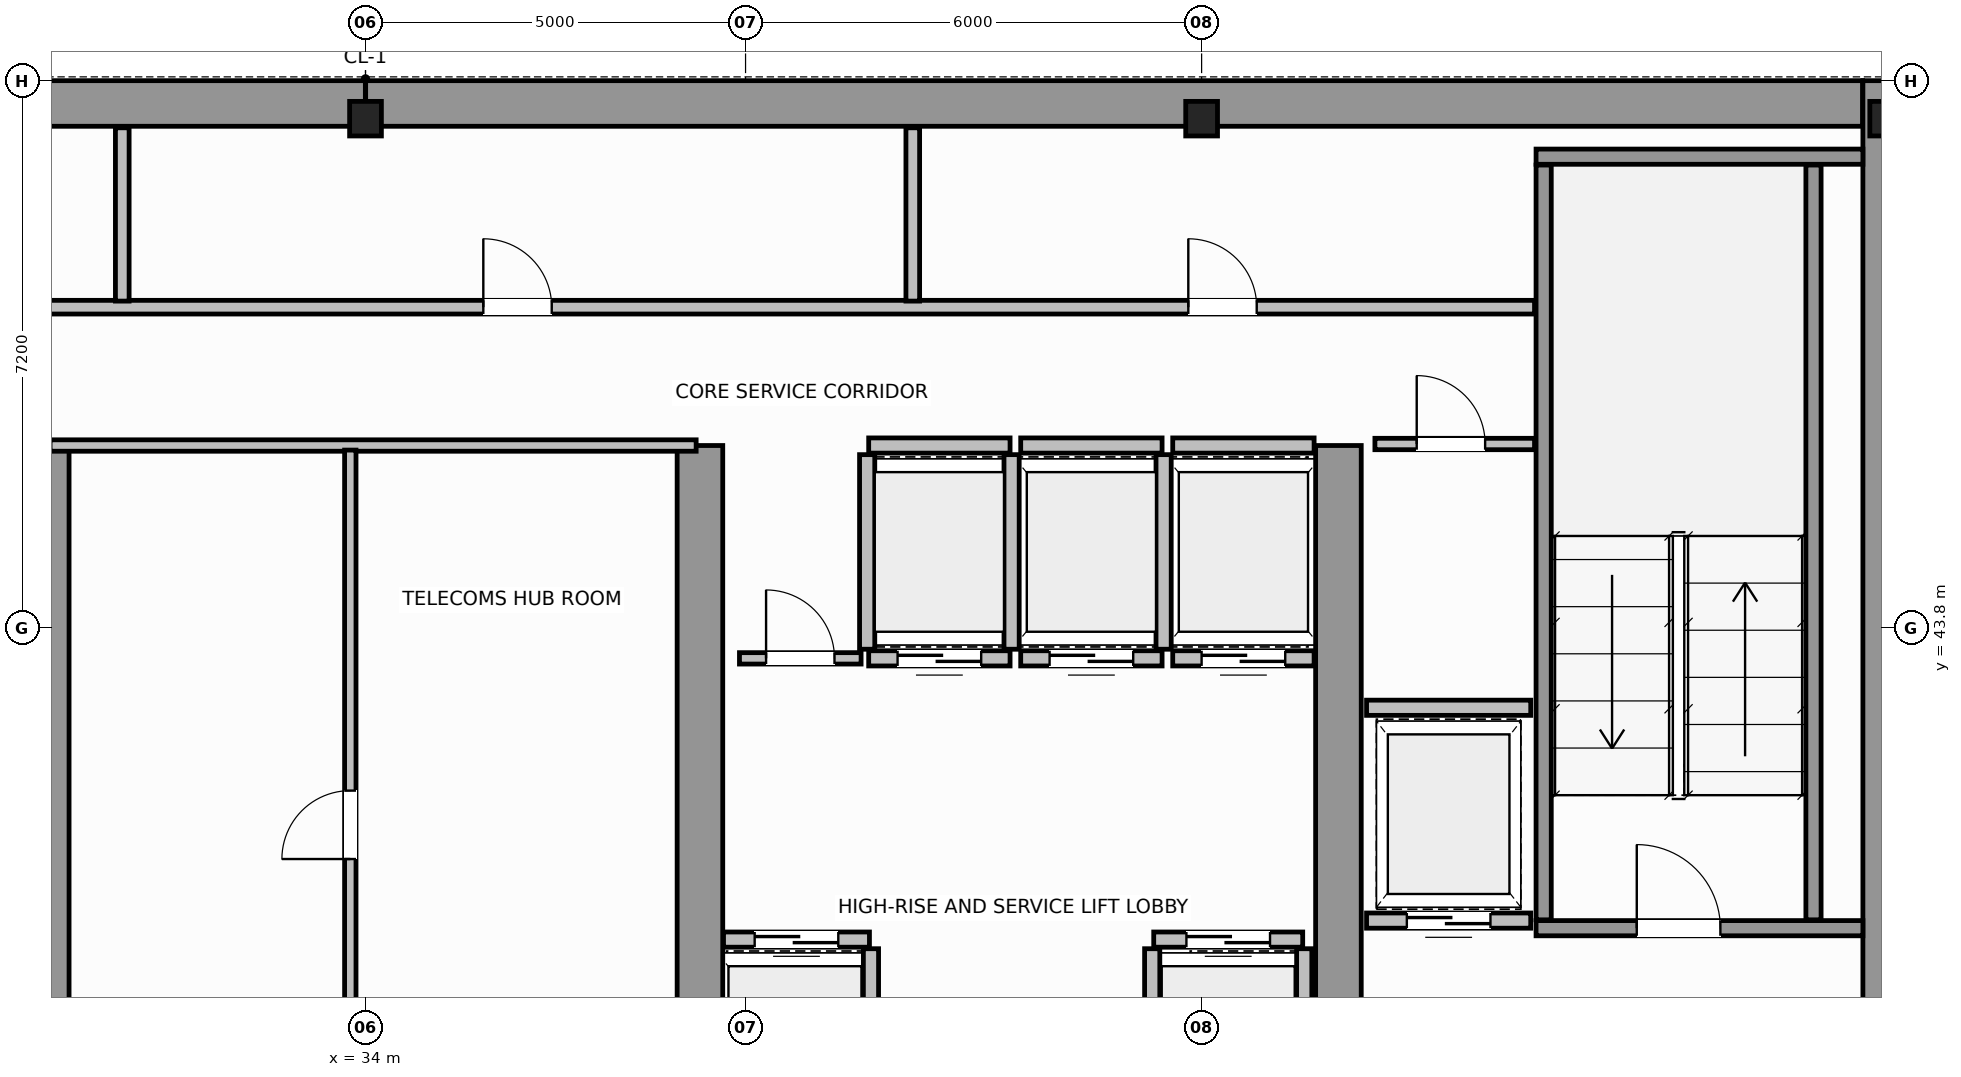
"""IFC4 building model, lengths in metres.
Left out: names, types, materials, properties, quantities, classifications, styles, units other than length and angle.
Written with IfcOpenShell. Run it as: python <this file> out.ifc"""

import sys

from ifc_helpers import new_model, si_unit, direction, frame, frame_2d, origin, origin_2d, place, context, subcontext, project, spatial, rectangle, i_section, extrude, source, transform, mapped, element, fill, save


model = new_model("IFC4")
c1 = context("Model", 3, precision=1e-05, world=origin(), true_north=direction((0.0, 1.0)))
c2 = subcontext(c1, "Body", "Model", "MODEL_VIEW")
j1 = project(units=[si_unit("LENGTHUNIT", "METRE"), si_unit("PLANEANGLEUNIT", "RADIAN")], contexts=[c1])
p1 = place(None, origin())
s1 = spatial("IfcSite", under=j1, at=p1, CompositionType="ELEMENT")
p2 = place(p1, origin())
s2 = spatial("IfcBuilding", under=s1, at=p2, CompositionType="ELEMENT")
p3 = place(p2, frame((0.0, 0.0, 238.4)))
s3 = spatial("IfcBuildingStorey", under=s2, at=p3, CompositionType="ELEMENT", Elevation=238.4)
m1 = source(origin(), c2, "Body", "SweptSolid", [
    extrude(i_section(OverallWidth=0.418, OverallDepth=0.455, WebThickness=0.042, FlangeThickness=0.058, FilletRadius=0.015, at=origin_2d()), origin(), (0.0, 0.0, 1.0), 3.8),
])
for number, where, z_axis, x_axis in (
    (1, (34.0, 50.5, 0.0), (0.0, 0.0, 1.0), (1.0, 0.0, 0.0)),
    (2, (45.0, 50.5, 0.0), (0.0, 0.0, 1.0), (1.0, 0.0, 0.0)),
    (3, (54.0, 50.5, 0.0), (0.0, 0.0, 1.0), (1.0, 0.0, 0.0)),
):
    element("IfcColumn", number, at=place(p3, frame(where, z_axis=z_axis, x_axis=x_axis)), inside=s3, PredefinedType="COLUMN", context=c2, shape_type="MappedRepresentation", body=[
        mapped(m1, transform((0.0, 0.0, 0.0), scale=1.0)),
    ])
for number, where, z_axis, x_axis in (
    (4, (14.304, 50.7, 0.0), (0.0, 0.0, 1.0), (1.0, 0.0, 0.0)),
    (5, (34.002, 50.7, 0.0), (0.0, 0.0, 1.0), (1.0, 0.0, 0.0)),
):
    element("IfcWall", number, at=place(p3, frame(where, z_axis=z_axis, x_axis=x_axis)), inside=s3, PredefinedType="SHEAR", context=c2, shape_type="SweptSolid", body=[
        extrude(rectangle(XDim=19.694, YDim=0.6, at=frame_2d((9.847, 0.0))), origin(), (0.0, 0.0, 1.0), 3.8),
    ])
p4 = place(p3, frame((54.0, 36.5, 0.0), z_axis=(0.0, 0.0, 1.0), x_axis=(0.0, 1.0, 0.0)))
e6 = element("IfcWall", 6, at=p4, inside=s3, PredefinedType="SHEAR", context=c2, shape_type="SweptSolid", body=[
    extrude(rectangle(XDim=14.5, YDim=0.6, at=frame_2d((7.25, 0.0))), origin(), (0.0, 0.0, 1.0), 3.8),
])
for number, where, z_axis, x_axis in (
    (7, (29.8, 36.82, 0.0), (0.0, 0.0, 1.0), (0.0, 1.0, 0.0)),
    (8, (38.4, 36.82, 0.0), (0.0, 0.0, 1.0), (0.0, 1.0, 0.0)),
    (9, (46.8, 36.82, 0.0), (0.0, 0.0, 1.0), (0.0, 1.0, 0.0)),
):
    element("IfcWall", number, at=place(p3, frame(where, z_axis=z_axis, x_axis=x_axis)), inside=s3, PredefinedType="SHEAR", context=c2, shape_type="SweptSolid", body=[
        extrude(rectangle(XDim=9.38, YDim=0.6, at=frame_2d((4.69, 0.0))), origin(), (0.0, 0.0, 1.0), 3.8),
    ])
p5 = place(p3, frame((49.4, 39.85, 0.0), z_axis=(0.0, 0.0, 1.0), x_axis=(1.0, 0.0, 0.0)))
e10 = element("IfcWall", 10, at=p5, inside=s3, PredefinedType="SOLIDWALL", context=c2, shape_type="SweptSolid", body=[
    extrude(rectangle(XDim=4.3, YDim=0.2, at=frame_2d((2.15, 0.0))), origin(), (0.0, 0.0, 1.0), 3.8),
])
p6 = place(p5, frame((1.325, 0.0, 0.0)))
e11 = element("IfcOpeningElement", 11, at=p6, cuts=e10, PredefinedType="OPENING", context=c2, shape_type="SweptSolid", body=[
    extrude(rectangle(XDim=1.1, YDim=2.15, at=frame_2d((0.55, 1.075))), frame((0.0, 0.11, 0.0), z_axis=(0.0, -1.0, 0.0), x_axis=(1.0, 0.0, 0.0)), (0.0, 0.0, 1.0), 0.22),
])
p7 = place(p3, frame((49.4, 50.0, 0.0), z_axis=(0.0, 0.0, 1.0), x_axis=(1.0, 0.0, 0.0)))
e12 = element("IfcWall", 12, at=p7, inside=s3, PredefinedType="SOLIDWALL", context=c2, shape_type="SweptSolid", body=[
    extrude(rectangle(XDim=4.3, YDim=0.2, at=frame_2d((2.15, 0.0))), origin(), (0.0, 0.0, 1.0), 3.8),
])
for number, where, z_axis, x_axis in (
    (13, (49.5, 39.96, 0.0), (0.0, 0.0, 1.0), (0.0, 1.0, 0.0)),
    (14, (53.05, 39.96, 0.0), (0.0, 0.0, 1.0), (0.0, 1.0, 0.0)),
):
    element("IfcWall", number, at=place(p3, frame(where, z_axis=z_axis, x_axis=x_axis)), inside=s3, PredefinedType="SOLIDWALL", context=c2, shape_type="SweptSolid", body=[
        extrude(rectangle(XDim=9.93, YDim=0.2, at=frame_2d((4.965, 0.0))), origin(), (0.0, 0.0, 1.0), 3.8),
    ])
p8 = place(p3, frame((38.71, 39.7, 0.0), z_axis=(0.0, 0.0, 1.0), x_axis=(1.0, 0.0, 0.0)))
e15 = element("IfcWall", 15, at=p8, inside=s3, PredefinedType="SOLIDWALL", context=c2, shape_type="SweptSolid", body=[
    extrude(rectangle(XDim=1.92, YDim=0.2, at=frame_2d((0.96, 0.0))), origin(), (0.0, 0.0, 1.0), 3.58),
])
p9 = place(p8, frame((0.41, 0.0, 0.0)))
e16 = element("IfcOpeningElement", 16, at=p9, cuts=e15, PredefinedType="OPENING", context=c2, shape_type="SweptSolid", body=[
    extrude(rectangle(XDim=1.1, YDim=2.15, at=frame_2d((0.55, 1.075))), frame((0.0, 0.11, 0.0), z_axis=(0.0, -1.0, 0.0), x_axis=(1.0, 0.0, 0.0)), (0.0, 0.0, 1.0), 0.22),
])
p10 = place(p3, frame((40.65, 37.02, 0.0), z_axis=(0.0, 0.0, 1.0), x_axis=(0.0, 1.0, 0.0)))
e17 = element("IfcWall", 17, at=p10, inside=s3, PredefinedType="SOLIDWALL", context=c2, shape_type="SweptSolid", body=[
    extrude(rectangle(XDim=2.56, YDim=0.2, at=frame_2d((1.28, 0.0))), origin(), (0.0, 0.0, 1.0), 3.58),
])
p11 = place(p3, frame((44.37, 39.7, 0.0), z_axis=(0.0, 0.0, 1.0), x_axis=(1.0, 0.0, 0.0)))
e18 = element("IfcWall", 18, at=p11, inside=s3, PredefinedType="SOLIDWALL", context=c2, shape_type="SweptSolid", body=[
    extrude(rectangle(XDim=1.96, YDim=0.2, at=frame_2d((0.98, 0.0))), origin(), (0.0, 0.0, 1.0), 3.58),
])
p12 = place(p11, frame((0.43, 0.0, 0.0)))
e19 = element("IfcOpeningElement", 19, at=p12, cuts=e18, PredefinedType="OPENING", context=c2, shape_type="SweptSolid", body=[
    extrude(rectangle(XDim=1.1, YDim=2.15, at=frame_2d((0.55, 1.075))), frame((0.0, 0.11, 0.0), z_axis=(0.0, -1.0, 0.0), x_axis=(1.0, 0.0, 0.0)), (0.0, 0.0, 1.0), 0.22),
])
for number, where, z_axis, x_axis in (
    (20, (44.35, 37.02, 0.0), (0.0, 0.0, 1.0), (0.0, 1.0, 0.0)),
    (21, (46.35, 37.02, 0.0), (0.0, 0.0, 1.0), (0.0, 1.0, 0.0)),
):
    element("IfcWall", number, at=place(p3, frame(where, z_axis=z_axis, x_axis=x_axis)), inside=s3, PredefinedType="SOLIDWALL", context=c2, shape_type="SweptSolid", body=[
        extrude(rectangle(XDim=2.56, YDim=0.2, at=frame_2d((1.28, 0.0))), origin(), (0.0, 0.0, 1.0), 3.58),
    ])
p13 = place(p3, frame((40.62, 43.4, 0.0), z_axis=(0.0, 0.0, 1.0), x_axis=(1.0, 0.0, 0.0)))
e22 = element("IfcWall", 22, at=p13, inside=s3, PredefinedType="SOLIDWALL", context=c2, shape_type="SweptSolid", body=[
    extrude(rectangle(XDim=1.86, YDim=0.2, at=frame_2d((0.93, 0.0))), origin(), (0.0, 0.0, 1.0), 3.58),
])
p14 = place(p13, frame((0.38, 0.0, 0.0)))
e23 = element("IfcOpeningElement", 23, at=p14, cuts=e22, PredefinedType="OPENING", context=c2, shape_type="SweptSolid", body=[
    extrude(rectangle(XDim=1.1, YDim=2.15, at=frame_2d((0.55, 1.075))), frame((0.0, 0.11, 0.0), z_axis=(0.0, -1.0, 0.0), x_axis=(1.0, 0.0, 0.0)), (0.0, 0.0, 1.0), 0.22),
])
p15 = place(p3, frame((40.62, 46.2, 0.0), z_axis=(0.0, 0.0, 1.0), x_axis=(1.0, 0.0, 0.0)))
e24 = element("IfcWall", 24, at=p15, inside=s3, PredefinedType="SOLIDWALL", context=c2, shape_type="SweptSolid", body=[
    extrude(rectangle(XDim=1.86, YDim=0.2, at=frame_2d((0.93, 0.0))), origin(), (0.0, 0.0, 1.0), 3.58),
])
for number, where, z_axis, x_axis in (
    (25, (40.6, 43.52, 0.0), (0.0, 0.0, 1.0), (0.0, 1.0, 0.0)),
    (26, (42.5, 43.52, 0.0), (0.0, 0.0, 1.0), (0.0, 1.0, 0.0)),
):
    element("IfcWall", number, at=place(p3, frame(where, z_axis=z_axis, x_axis=x_axis)), inside=s3, PredefinedType="SOLIDWALL", context=c2, shape_type="SweptSolid", body=[
        extrude(rectangle(XDim=2.56, YDim=0.2, at=frame_2d((1.28, 0.0))), origin(), (0.0, 0.0, 1.0), 3.58),
    ])
p16 = place(p3, frame((42.62, 43.4, 0.0), z_axis=(0.0, 0.0, 1.0), x_axis=(1.0, 0.0, 0.0)))
e27 = element("IfcWall", 27, at=p16, inside=s3, PredefinedType="SOLIDWALL", context=c2, shape_type="SweptSolid", body=[
    extrude(rectangle(XDim=1.86, YDim=0.2, at=frame_2d((0.93, 0.0))), origin(), (0.0, 0.0, 1.0), 3.58),
])
p17 = place(p16, frame((0.38, 0.0, 0.0)))
e28 = element("IfcOpeningElement", 28, at=p17, cuts=e27, PredefinedType="OPENING", context=c2, shape_type="SweptSolid", body=[
    extrude(rectangle(XDim=1.1, YDim=2.15, at=frame_2d((0.55, 1.075))), frame((0.0, 0.11, 0.0), z_axis=(0.0, -1.0, 0.0), x_axis=(1.0, 0.0, 0.0)), (0.0, 0.0, 1.0), 0.22),
])
p18 = place(p3, frame((42.62, 46.2, 0.0), z_axis=(0.0, 0.0, 1.0), x_axis=(1.0, 0.0, 0.0)))
e29 = element("IfcWall", 29, at=p18, inside=s3, PredefinedType="SOLIDWALL", context=c2, shape_type="SweptSolid", body=[
    extrude(rectangle(XDim=1.86, YDim=0.2, at=frame_2d((0.93, 0.0))), origin(), (0.0, 0.0, 1.0), 3.58),
])
p19 = place(p3, frame((44.5, 43.52, 0.0), z_axis=(0.0, 0.0, 1.0), x_axis=(0.0, 1.0, 0.0)))
e30 = element("IfcWall", 30, at=p19, inside=s3, PredefinedType="SOLIDWALL", context=c2, shape_type="SweptSolid", body=[
    extrude(rectangle(XDim=2.56, YDim=0.2, at=frame_2d((1.28, 0.0))), origin(), (0.0, 0.0, 1.0), 3.58),
])
p20 = place(p3, frame((44.62, 43.4, 0.0), z_axis=(0.0, 0.0, 1.0), x_axis=(1.0, 0.0, 0.0)))
e31 = element("IfcWall", 31, at=p20, inside=s3, PredefinedType="SOLIDWALL", context=c2, shape_type="SweptSolid", body=[
    extrude(rectangle(XDim=1.86, YDim=0.2, at=frame_2d((0.93, 0.0))), origin(), (0.0, 0.0, 1.0), 3.58),
])
p21 = place(p20, frame((0.38, 0.0, 0.0)))
e32 = element("IfcOpeningElement", 32, at=p21, cuts=e31, PredefinedType="OPENING", context=c2, shape_type="SweptSolid", body=[
    extrude(rectangle(XDim=1.1, YDim=2.15, at=frame_2d((0.55, 1.075))), frame((0.0, 0.11, 0.0), z_axis=(0.0, -1.0, 0.0), x_axis=(1.0, 0.0, 0.0)), (0.0, 0.0, 1.0), 0.22),
])
p22 = place(p3, frame((44.62, 46.2, 0.0), z_axis=(0.0, 0.0, 1.0), x_axis=(1.0, 0.0, 0.0)))
e33 = element("IfcWall", 33, at=p22, inside=s3, PredefinedType="SOLIDWALL", context=c2, shape_type="SweptSolid", body=[
    extrude(rectangle(XDim=1.86, YDim=0.2, at=frame_2d((0.93, 0.0))), origin(), (0.0, 0.0, 1.0), 3.58),
])
p23 = place(p3, frame((47.17, 39.95, 0.0), z_axis=(0.0, 0.0, 1.0), x_axis=(1.0, 0.0, 0.0)))
e34 = element("IfcWall", 34, at=p23, inside=s3, PredefinedType="SOLIDWALL", context=c2, shape_type="SweptSolid", body=[
    extrude(rectangle(XDim=2.16, YDim=0.2, at=frame_2d((1.08, 0.0))), origin(), (0.0, 0.0, 1.0), 3.58),
])
p24 = place(p23, frame((0.53, 0.0, 0.0)))
e35 = element("IfcOpeningElement", 35, at=p24, cuts=e34, PredefinedType="OPENING", context=c2, shape_type="SweptSolid", body=[
    extrude(rectangle(XDim=1.1, YDim=2.15, at=frame_2d((0.55, 1.075))), frame((0.0, 0.11, 0.0), z_axis=(0.0, -1.0, 0.0), x_axis=(1.0, 0.0, 0.0)), (0.0, 0.0, 1.0), 0.22),
])
p25 = place(p3, frame((47.17, 42.75, 0.0), z_axis=(0.0, 0.0, 1.0), x_axis=(1.0, 0.0, 0.0)))
e36 = element("IfcWall", 36, at=p25, inside=s3, PredefinedType="SOLIDWALL", context=c2, shape_type="SweptSolid", body=[
    extrude(rectangle(XDim=2.16, YDim=0.2, at=frame_2d((1.08, 0.0))), origin(), (0.0, 0.0, 1.0), 3.58),
])
p26 = place(p3, frame((29.85, 46.2, 0.0), z_axis=(0.0, 0.0, 1.0), x_axis=(1.0, 0.0, 0.0)))
e37 = element("IfcWall", 37, at=p26, inside=s3, PredefinedType="PARTITIONING", context=c2, shape_type="SweptSolid", body=[
    extrude(rectangle(XDim=8.5, YDim=0.15, at=frame_2d((4.25, 0.0))), origin(), (0.0, 0.0, 1.0), 3.58),
])
p27 = place(p3, frame((33.8, 36.56, 0.0), z_axis=(0.0, 0.0, 1.0), x_axis=(0.0, 1.0, 0.0)))
e38 = element("IfcWall", 38, at=p27, inside=s3, PredefinedType="PARTITIONING", context=c2, shape_type="SweptSolid", body=[
    extrude(rectangle(XDim=9.58, YDim=0.15, at=frame_2d((4.79, 0.0))), origin(), (0.0, 0.0, 1.0), 3.58),
])
p28 = place(p27, frame((4.2, 0.0, 0.0)))
e39 = element("IfcOpeningElement", 39, at=p28, cuts=e38, PredefinedType="OPENING", context=c2, shape_type="SweptSolid", body=[
    extrude(rectangle(XDim=0.9, YDim=2.1, at=frame_2d((0.45, 1.05))), frame((0.0, 0.085, 0.0), z_axis=(0.0, -1.0, 0.0), x_axis=(1.0, 0.0, 0.0)), (0.0, 0.0, 1.0), 0.17),
])
p29 = place(p3, frame((47.28, 46.22, 0.0), z_axis=(0.0, 0.0, 1.0), x_axis=(1.0, 0.0, 0.0)))
e40 = element("IfcWall", 40, at=p29, inside=s3, PredefinedType="PARTITIONING", context=c2, shape_type="SweptSolid", body=[
    extrude(rectangle(XDim=2.1, YDim=0.15, at=frame_2d((1.05, 0.0))), origin(), (0.0, 0.0, 1.0), 3.58),
])
p30 = place(p29, frame((0.55, 0.0, 0.0)))
e41 = element("IfcOpeningElement", 41, at=p30, cuts=e40, PredefinedType="OPENING", context=c2, shape_type="SweptSolid", body=[
    extrude(rectangle(XDim=0.9, YDim=2.1, at=frame_2d((0.45, 1.05))), frame((0.0, 0.085, 0.0), z_axis=(0.0, -1.0, 0.0), x_axis=(1.0, 0.0, 0.0)), (0.0, 0.0, 1.0), 0.17),
])
p31 = place(p3, frame((38.92, 43.4, 0.0), z_axis=(0.0, 0.0, 1.0), x_axis=(1.0, 0.0, 0.0)))
e42 = element("IfcWall", 42, at=p31, inside=s3, PredefinedType="PARTITIONING", context=c2, shape_type="SweptSolid", body=[
    extrude(rectangle(XDim=1.6, YDim=0.15, at=frame_2d((0.8, 0.0))), origin(), (0.0, 0.0, 1.0), 3.58),
])
p32 = place(p31, frame((0.35, 0.0, 0.0)))
e43 = element("IfcOpeningElement", 43, at=p32, cuts=e42, PredefinedType="OPENING", context=c2, shape_type="SweptSolid", body=[
    extrude(rectangle(XDim=0.9, YDim=2.1, at=frame_2d((0.45, 1.05))), frame((0.0, 0.085, 0.0), z_axis=(0.0, -1.0, 0.0), x_axis=(1.0, 0.0, 0.0)), (0.0, 0.0, 1.0), 0.17),
])
p33 = place(p3, frame((18.62, 48.02, 0.0), z_axis=(0.0, 0.0, 1.0), x_axis=(1.0, 0.0, 0.0)))
e44 = element("IfcWall", 44, at=p33, inside=s3, PredefinedType="PLUMBINGWALL", context=c2, shape_type="SweptSolid", body=[
    extrude(rectangle(XDim=30.76, YDim=0.18, at=frame_2d((15.38, 0.0))), origin(), (0.0, 0.0, 1.0), 3.58),
])
p34 = place(p33, frame((1.955, 0.0, 0.0)))
e45 = element("IfcOpeningElement", 45, at=p34, cuts=e44, PredefinedType="OPENING", context=c2, shape_type="SweptSolid", body=[
    extrude(rectangle(XDim=0.9, YDim=2.15, at=frame_2d((0.45, 1.075))), frame((0.0, 0.1, 0.0), z_axis=(0.0, -1.0, 0.0), x_axis=(1.0, 0.0, 0.0)), (0.0, 0.0, 1.0), 0.2),
])
p35 = place(p33, frame((8.03, 0.0, 0.0)))
e46 = element("IfcOpeningElement", 46, at=p35, cuts=e44, PredefinedType="OPENING", context=c2, shape_type="SweptSolid", body=[
    extrude(rectangle(XDim=0.9, YDim=2.15, at=frame_2d((0.45, 1.075))), frame((0.0, 0.1, 0.0), z_axis=(0.0, -1.0, 0.0), x_axis=(1.0, 0.0, 0.0)), (0.0, 0.0, 1.0), 0.2),
])
p36 = place(p33, frame((16.93, 0.0, 0.0)))
e47 = element("IfcOpeningElement", 47, at=p36, cuts=e44, PredefinedType="OPENING", context=c2, shape_type="SweptSolid", body=[
    extrude(rectangle(XDim=0.9, YDim=2.15, at=frame_2d((0.45, 1.075))), frame((0.0, 0.1, 0.0), z_axis=(0.0, -1.0, 0.0), x_axis=(1.0, 0.0, 0.0)), (0.0, 0.0, 1.0), 0.2),
])
p37 = place(p33, frame((26.205, 0.0, 0.0)))
e48 = element("IfcOpeningElement", 48, at=p37, cuts=e44, PredefinedType="OPENING", context=c2, shape_type="SweptSolid", body=[
    extrude(rectangle(XDim=0.9, YDim=2.15, at=frame_2d((0.45, 1.075))), frame((0.0, 0.1, 0.0), z_axis=(0.0, -1.0, 0.0), x_axis=(1.0, 0.0, 0.0)), (0.0, 0.0, 1.0), 0.2),
])
for number, where, z_axis, x_axis in (
    (49, (30.8, 48.1, 0.0), (0.0, 0.0, 1.0), (0.0, 1.0, 0.0)),
    (50, (41.2, 48.1, 0.0), (0.0, 0.0, 1.0), (0.0, 1.0, 0.0)),
):
    element("IfcWall", number, at=place(p3, frame(where, z_axis=z_axis, x_axis=x_axis)), inside=s3, PredefinedType="PLUMBINGWALL", context=c2, shape_type="SweptSolid", body=[
        extrude(rectangle(XDim=2.28, YDim=0.18, at=frame_2d((1.14, 0.0))), origin(), (0.0, 0.0, 1.0), 3.58),
    ])
m2 = source(origin(), c2, "Body", "SweptSolid", [
    extrude(rectangle(XDim=1.1, YDim=2.15, at=frame_2d((0.55, 1.075))), frame((0.0, 0.025, 0.0), z_axis=(0.0, -1.0, 0.0), x_axis=(1.0, 0.0, 0.0)), (0.0, 0.0, 1.0), 0.05),
])
p38 = place(p6, origin())
e51 = element("IfcDoor", 51, at=p38, inside=s3, OperationType="SINGLE_SWING_RIGHT", PredefinedType="DOOR", context=c2, shape_type="MappedRepresentation", body=[
    mapped(m2, transform((0.0, 0.0, 0.0), scale=1.0)),
])
fill(e11, e51)
p39 = place(p9, origin())
e52 = element("IfcDoor", 52, at=p39, inside=s3, OperationType="DOUBLE_DOOR_SLIDING", PredefinedType="DOOR", context=c2, shape_type="MappedRepresentation", body=[
    mapped(m2, transform((0.0, 0.0, 0.0), scale=1.0)),
])
fill(e16, e52)
p40 = place(p12, origin())
e53 = element("IfcDoor", 53, at=p40, inside=s3, OperationType="DOUBLE_DOOR_SLIDING", PredefinedType="DOOR", context=c2, shape_type="MappedRepresentation", body=[
    mapped(m2, transform((0.0, 0.0, 0.0), scale=1.0)),
])
fill(e19, e53)
p41 = place(p14, origin())
e54 = element("IfcDoor", 54, at=p41, inside=s3, OperationType="DOUBLE_DOOR_SLIDING", PredefinedType="DOOR", context=c2, shape_type="MappedRepresentation", body=[
    mapped(m2, transform((0.0, 0.0, 0.0), scale=1.0)),
])
fill(e23, e54)
p42 = place(p17, origin())
e55 = element("IfcDoor", 55, at=p42, inside=s3, OperationType="DOUBLE_DOOR_SLIDING", PredefinedType="DOOR", context=c2, shape_type="MappedRepresentation", body=[
    mapped(m2, transform((0.0, 0.0, 0.0), scale=1.0)),
])
fill(e28, e55)
p43 = place(p21, origin())
e56 = element("IfcDoor", 56, at=p43, inside=s3, OperationType="DOUBLE_DOOR_SLIDING", PredefinedType="DOOR", context=c2, shape_type="MappedRepresentation", body=[
    mapped(m2, transform((0.0, 0.0, 0.0), scale=1.0)),
])
fill(e32, e56)
p44 = place(p24, origin())
e57 = element("IfcDoor", 57, at=p44, inside=s3, OperationType="DOUBLE_DOOR_SLIDING", PredefinedType="DOOR", context=c2, shape_type="MappedRepresentation", body=[
    mapped(m2, transform((0.0, 0.0, 0.0), scale=1.0)),
])
fill(e35, e57)
m3 = source(origin(), c2, "Body", "SweptSolid", [
    extrude(rectangle(XDim=0.9, YDim=2.1, at=frame_2d((0.45, 1.05))), frame((0.0, 0.025, 0.0), z_axis=(0.0, -1.0, 0.0), x_axis=(1.0, 0.0, 0.0)), (0.0, 0.0, 1.0), 0.05),
])
p45 = place(p28, origin())
e58 = element("IfcDoor", 58, at=p45, inside=s3, OperationType="SINGLE_SWING_RIGHT", PredefinedType="DOOR", context=c2, shape_type="MappedRepresentation", body=[
    mapped(m3, transform((0.0, 0.0, 0.0), scale=1.0)),
])
fill(e39, e58)
p46 = place(p30, origin())
e59 = element("IfcDoor", 59, at=p46, inside=s3, OperationType="SINGLE_SWING_RIGHT", PredefinedType="DOOR", context=c2, shape_type="MappedRepresentation", body=[
    mapped(m3, transform((0.0, 0.0, 0.0), scale=1.0)),
])
fill(e41, e59)
p47 = place(p32, origin())
e60 = element("IfcDoor", 60, at=p47, inside=s3, OperationType="SINGLE_SWING_LEFT", PredefinedType="DOOR", context=c2, shape_type="MappedRepresentation", body=[
    mapped(m3, transform((0.0, 0.0, 0.0), scale=1.0)),
])
fill(e43, e60)
m4 = source(origin(), c2, "Body", "SweptSolid", [
    extrude(rectangle(XDim=0.9, YDim=2.15, at=frame_2d((0.45, 1.075))), frame((0.0, 0.025, 0.0), z_axis=(0.0, -1.0, 0.0), x_axis=(1.0, 0.0, 0.0)), (0.0, 0.0, 1.0), 0.05),
])
p48 = place(p36, origin())
e61 = element("IfcDoor", 61, at=p48, inside=s3, OperationType="SINGLE_SWING_LEFT", PredefinedType="DOOR", context=c2, shape_type="MappedRepresentation", body=[
    mapped(m4, transform((0.0, 0.0, 0.0), scale=1.0)),
])
fill(e47, e61)
p49 = place(p37, origin())
e62 = element("IfcDoor", 62, at=p49, inside=s3, OperationType="SINGLE_SWING_RIGHT", PredefinedType="DOOR", context=c2, shape_type="MappedRepresentation", body=[
    mapped(m4, transform((0.0, 0.0, 0.0), scale=1.0)),
])
fill(e48, e62)
save(model, sys.argv[1])
